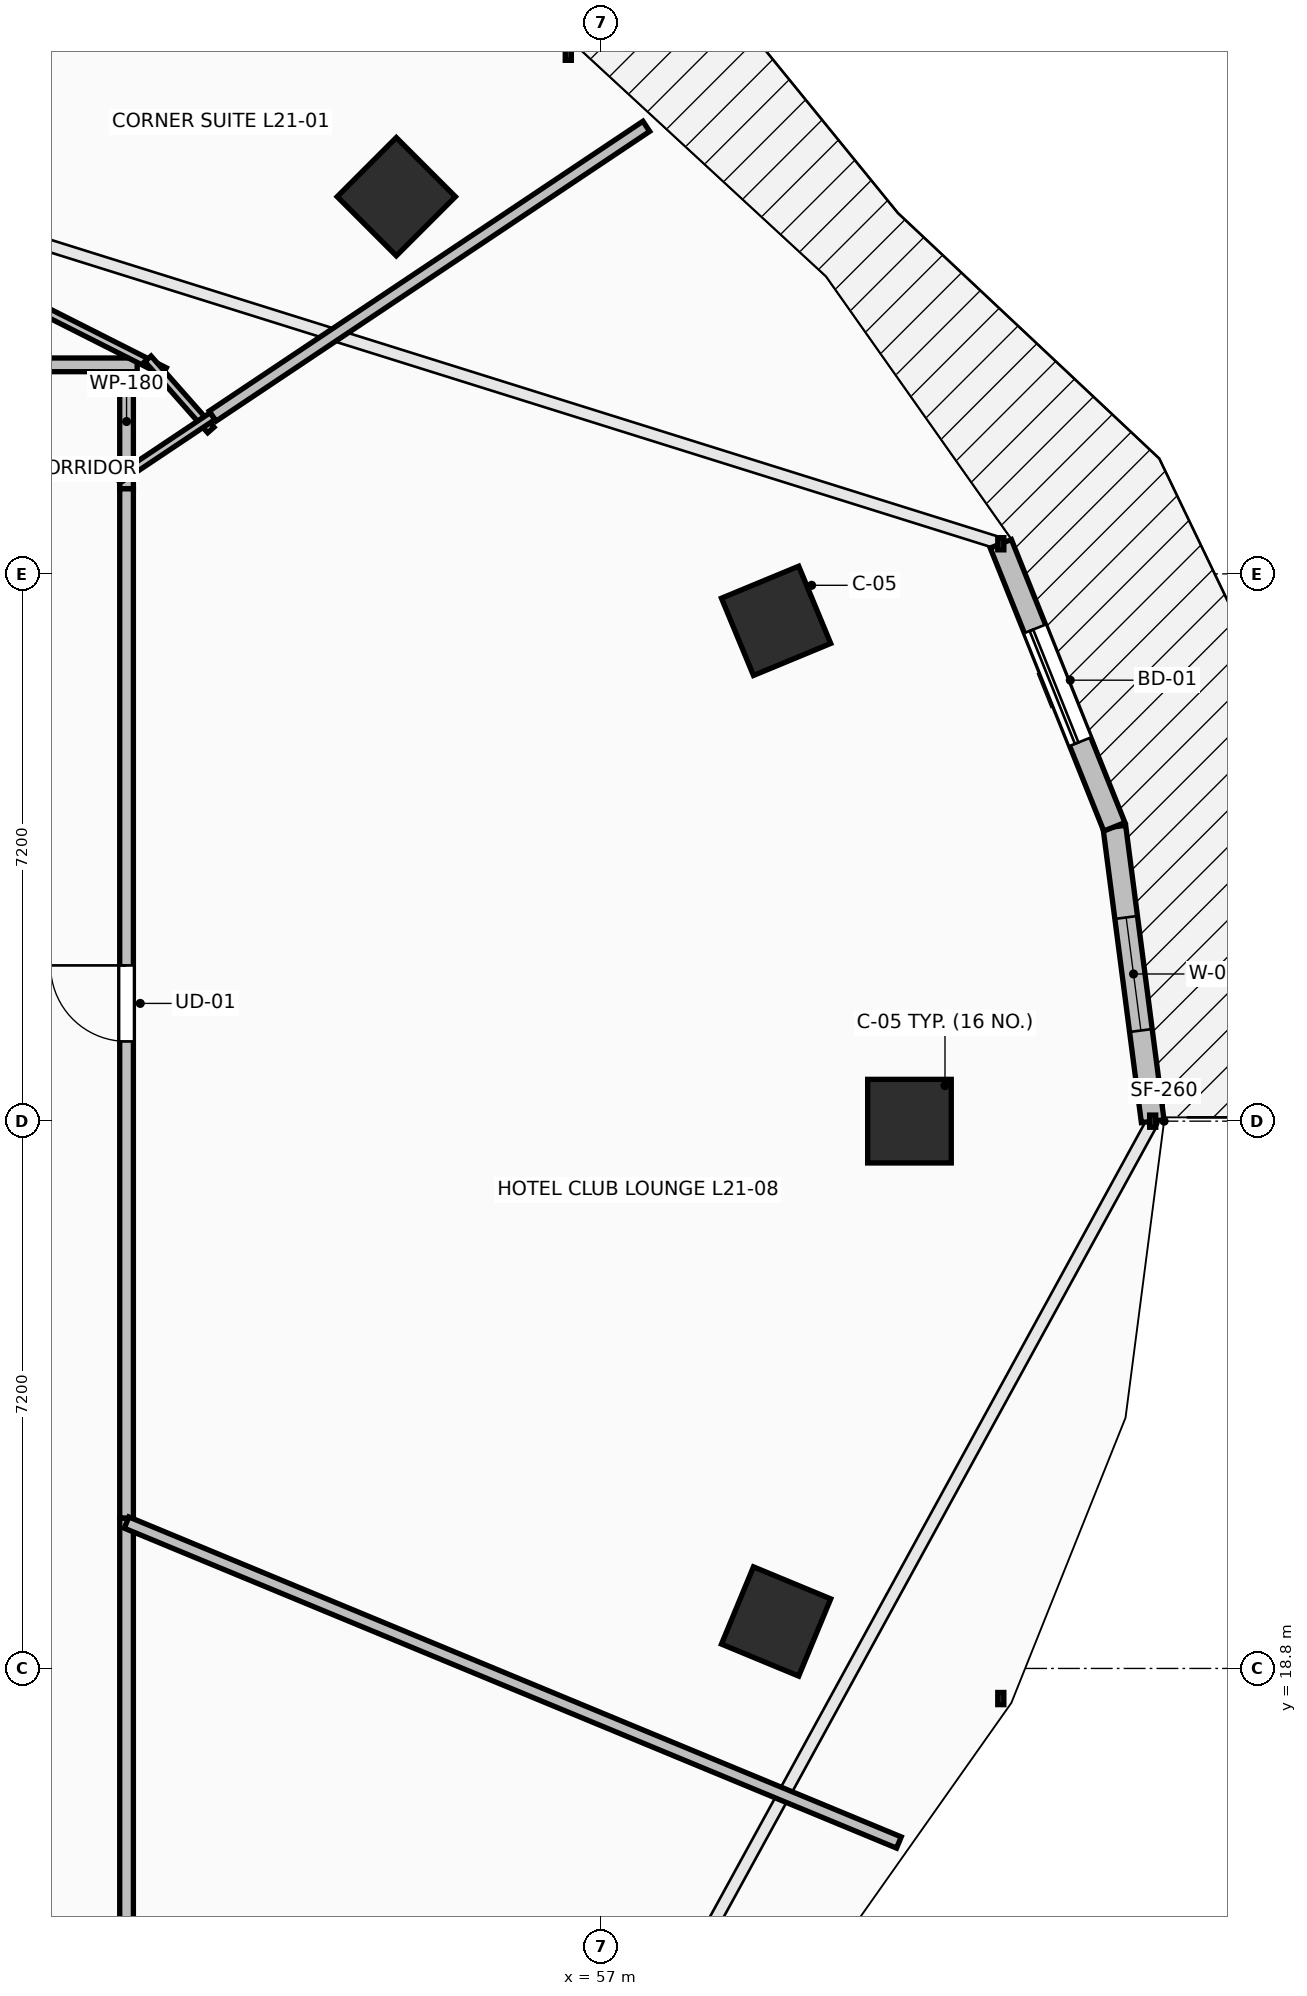
"""IFC4 building model, lengths in metres.
Left out: names, types, materials, properties, quantities, classifications, styles, units other than length and angle.
Written with IfcOpenShell. Run it as: python <this file> out.ifc"""

import sys

from ifc_helpers import new_model, si_unit, direction, frame, frame_2d, origin, origin_2d, place, context, subcontext, project, spatial, rectangle, extrude, element, fill, save


model = new_model("IFC4")
c1 = context("Model", 3, precision=1e-05, world=origin(), true_north=direction((0.0, 1.0)))
c2 = subcontext(c1, "Body", "Model", "MODEL_VIEW")
j1 = project(units=[si_unit("LENGTHUNIT", "METRE"), si_unit("PLANEANGLEUNIT", "RADIAN")], contexts=[c1])
p1 = place(None, origin())
s1 = spatial("IfcSite", under=j1, at=p1, CompositionType="ELEMENT")
p2 = place(p1, origin())
s2 = spatial("IfcBuilding", under=s1, at=p2, CompositionType="ELEMENT")
p3 = place(p2, frame((0.0, 0.0, 82.3)))
s3 = spatial("IfcBuildingStorey", under=s2, at=p3, CompositionType="ELEMENT", Elevation=82.3)
for number, where, z_axis, x_axis in (
    (1, (61.05, 26.0, 0.0), (0.0, 0.0, 1.0), (1.0, 0.0, 0.0)),
    (2, (59.295, 32.582, 0.0), (0.0, 0.0, 1.0), (0.924, 0.383, 0.0)),
    (3, (54.299, 38.162, 0.0), (0.0, 0.0, 1.0), (0.707, 0.707, 0.0)),
    (4, (59.295, 19.418, 0.0), (0.0, 0.0, 1.0), (0.924, -0.383, 0.0)),
):
    element("IfcColumn", number, at=place(p3, frame(where, z_axis=z_axis, x_axis=x_axis)), inside=s3, PredefinedType="COLUMN", context=c2, shape_type="SweptSolid", body=[
        extrude(rectangle(XDim=1.1, YDim=1.1, at=origin_2d()), origin(), (0.0, 0.0, 1.0), 3.5),
    ])
p4 = place(p3, frame((64.25, 26.0, 0.0), z_axis=(0.0, 0.0, 1.0), x_axis=(-0.129157444793, 0.991624099372, 0.0)))
e5 = element("IfcWall", 5, at=p4, inside=s3, PredefinedType="STANDARD", context=c2, shape_type="SweptSolid", body=[
    extrude(rectangle(XDim=3.905, YDim=0.3, at=frame_2d((1.953, 0.0))), origin(), (0.0, 0.0, 1.0), 3.24),
])
p5 = place(p4, frame((1.203, 0.0, 0.85)))
e6 = element("IfcOpeningElement", 6, at=p5, cuts=e5, PredefinedType="OPENING", context=c2, shape_type="SweptSolid", body=[
    extrude(rectangle(XDim=1.5, YDim=2.19, at=frame_2d((0.75, 1.095))), frame((0.0, 0.165, 0.0), z_axis=(0.0, -1.0, 0.0), x_axis=(1.0, 0.0, 0.0)), (0.0, 0.0, 1.0), 0.33),
])
p6 = place(p3, frame((63.746, 29.873, 0.0), z_axis=(0.0, 0.0, 1.0), x_axis=(-0.372345205928, 0.92809430966, 0.0)))
e7 = element("IfcWall", 7, at=p6, inside=s3, PredefinedType="STANDARD", context=c2, shape_type="SweptSolid", body=[
    extrude(rectangle(XDim=4.012, YDim=0.3, at=frame_2d((2.006, 0.0))), origin(), (0.0, 0.0, 1.0), 3.24),
])
p7 = place(p6, frame((1.206, 0.0, 0.0)))
e8 = element("IfcOpeningElement", 8, at=p7, cuts=e7, PredefinedType="OPENING", context=c2, shape_type="SweptSolid", body=[
    extrude(rectangle(XDim=1.6, YDim=2.3, at=frame_2d((0.8, 1.15))), frame((0.0, 0.165, 0.0), z_axis=(0.0, -1.0, 0.0), x_axis=(1.0, 0.0, 0.0)), (0.0, 0.0, 1.0), 0.33),
])
p8 = place(p3, frame((50.75, 34.319, 0.0), z_axis=(0.0, 0.0, 1.0), x_axis=(0.0, 1.0, 0.0)))
e9 = element("IfcWall", 9, at=p8, inside=s3, PredefinedType="PARTITIONING", context=c2, shape_type="SweptSolid", body=[
    extrude(rectangle(XDim=1.771, YDim=0.18, at=frame_2d((0.885, 0.0))), origin(), (0.0, 0.0, 1.0), 2.432),
])
p9 = place(p3, frame((50.89, 35.95, 0.0), z_axis=(0.0, 0.0, 1.0), x_axis=(-1.0, 0.0, 0.0)))
e10 = element("IfcWall", 10, at=p9, inside=s3, PredefinedType="PARTITIONING", context=c2, shape_type="SweptSolid", body=[
    extrude(rectangle(XDim=5.606, YDim=0.18, at=frame_2d((2.803, 0.0))), origin(), (0.0, 0.0, 1.0), 2.432),
])
p10 = place(p3, frame((50.75, 14.1, 0.0), z_axis=(0.0, 0.0, 1.0), x_axis=(0.0, 1.0, 0.0)))
e11 = element("IfcWall", 11, at=p10, inside=s3, PredefinedType="PARTITIONING", context=c2, shape_type="SweptSolid", body=[
    extrude(rectangle(XDim=6.679, YDim=0.18, at=frame_2d((3.339, 0.0))), origin(), (0.0, 0.0, 1.0), 2.432),
])
p11 = place(p3, frame((50.75, 20.779, 0.0), z_axis=(0.0, 0.0, 1.0), x_axis=(0.0, 1.0, 0.0)))
e12 = element("IfcWall", 12, at=p11, inside=s3, PredefinedType="PARTITIONING", context=c2, shape_type="SweptSolid", body=[
    extrude(rectangle(XDim=13.54, YDim=0.18, at=frame_2d((6.77, 0.0))), origin(), (0.0, 0.0, 1.0), 2.432),
])
p12 = place(p11, frame((6.27, 0.0, 0.0)))
e13 = element("IfcOpeningElement", 13, at=p12, cuts=e12, PredefinedType="OPENING", context=c2, shape_type="SweptSolid", body=[
    extrude(rectangle(XDim=1.0, YDim=2.15, at=frame_2d((0.5, 1.075))), frame((0.0, 0.105, 0.0), z_axis=(0.0, -1.0, 0.0), x_axis=(1.0, 0.0, 0.0)), (0.0, 0.0, 1.0), 0.21),
])
p13 = place(p3, frame((46.78, 38.12, 0.0), z_axis=(0.0, 0.0, 1.0), x_axis=(0.892517538434, -0.451012686726, 0.0)))
e14 = element("IfcWall", 14, at=p13, inside=s3, PredefinedType="PARTITIONING", context=c2, shape_type="SweptSolid", body=[
    extrude(rectangle(XDim=5.007, YDim=0.11, at=frame_2d((2.503, 0.0))), origin(), (0.0, 0.0, 1.0), 2.432),
])
p14 = place(p13, frame((2.079, 0.0, 0.0)))
e15 = element("IfcOpeningElement", 15, at=p14, cuts=e14, PredefinedType="OPENING", context=c2, shape_type="SweptSolid", body=[
    extrude(rectangle(XDim=0.85, YDim=2.1, at=frame_2d((0.425, 1.05))), frame((0.0, 0.07, 0.0), z_axis=(0.0, -1.0, 0.0), x_axis=(1.0, 0.0, 0.0)), (0.0, 0.0, 1.0), 0.14),
])
p15 = place(p3, frame((51.031, 36.03, 0.0), z_axis=(0.0, 0.0, 1.0), x_axis=(0.661996266618, -0.749507133377, 0.0)))
e16 = element("IfcWall", 16, at=p15, inside=s3, PredefinedType="PARTITIONING", context=c2, shape_type="SweptSolid", body=[
    extrude(rectangle(XDim=1.25, YDim=0.11, at=frame_2d((0.625, 0.0))), origin(), (0.0, 0.0, 1.0), 2.432),
])
p16 = place(p3, frame((51.882, 35.276, 0.0), z_axis=(0.0, 0.0, 1.0), x_axis=(-0.831374526136, -0.555712513169, 0.0)))
e17 = element("IfcWall", 17, at=p16, inside=s3, PredefinedType="PARTITIONING", context=c2, shape_type="SweptSolid", body=[
    extrude(rectangle(XDim=1.502, YDim=0.11, at=frame_2d((0.751, 0.0))), origin(), (0.0, 0.0, 1.0), 2.922),
])
p17 = place(p3, frame((51.883, 35.276, 0.0), z_axis=(0.0, 0.0, 1.0), x_axis=(0.831464132421, 0.555578434154, 0.0)))
e18 = element("IfcWall", 18, at=p17, inside=s3, PredefinedType="PARTITIONING", context=c2, shape_type="SweptSolid", body=[
    extrude(rectangle(XDim=6.862, YDim=0.16, at=frame_2d((3.431, 0.0))), origin(), (0.0, 0.0, 1.0), 2.677),
])
p18 = place(p3, frame((60.911, 16.51, 0.0), z_axis=(0.0, 0.0, 1.0), x_axis=(-0.923872894692, 0.382699457086, 0.0)))
e19 = element("IfcWall", 19, at=p18, inside=s3, PredefinedType="PARTITIONING", context=c2, shape_type="SweptSolid", body=[
    extrude(rectangle(XDim=10.998, YDim=0.16, at=frame_2d((5.499, 0.0))), origin(), (0.0, 0.0, 1.0), 2.677),
])
p19 = place(p7, origin())
e20 = element("IfcDoor", 20, at=p19, inside=s3, OperationType="SLIDING_TO_LEFT", PredefinedType="DOOR", context=c2, shape_type="SweptSolid", body=[
    extrude(rectangle(XDim=1.6, YDim=2.3, at=frame_2d((0.8, 1.15))), frame((0.0, 0.025, 0.0), z_axis=(0.0, -1.0, 0.0), x_axis=(1.0, 0.0, 0.0)), (0.0, 0.0, 1.0), 0.05),
])
fill(e8, e20)
p20 = place(p5, origin())
e21 = element("IfcWindow", 21, at=p20, inside=s3, PartitioningType="SINGLE_PANEL", PredefinedType="WINDOW", context=c2, shape_type="SweptSolid", body=[
    extrude(rectangle(XDim=1.5, YDim=2.19, at=frame_2d((0.75, 1.095))), frame((0.0, 0.03, 0.0), z_axis=(0.0, -1.0, 0.0), x_axis=(1.0, 0.0, 0.0)), (0.0, 0.0, 1.0), 0.06),
])
fill(e6, e21)
p21 = place(p12, origin())
e22 = element("IfcDoor", 22, at=p21, inside=s3, OperationType="SINGLE_SWING_RIGHT", PredefinedType="DOOR", context=c2, shape_type="SweptSolid", body=[
    extrude(rectangle(XDim=1.0, YDim=2.15, at=frame_2d((0.5, 1.075))), frame((0.0, 0.025, 0.0), z_axis=(0.0, -1.0, 0.0), x_axis=(1.0, 0.0, 0.0)), (0.0, 0.0, 1.0), 0.05),
])
fill(e13, e22)
save(model, sys.argv[1])
